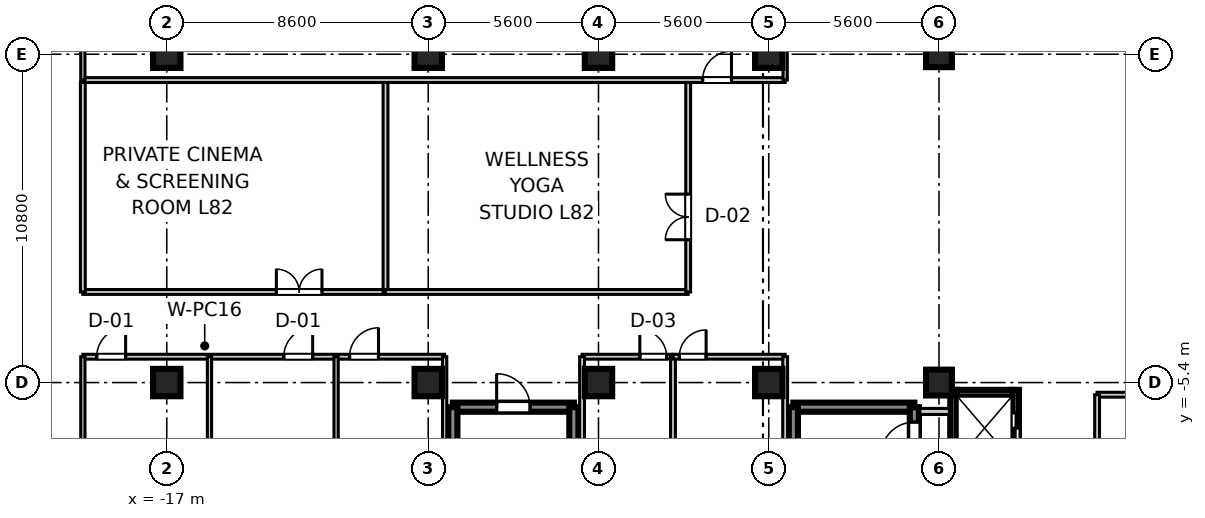
"""IFC4 building model, lengths in metres.
Left out: names, types, materials, properties, quantities, classifications, styles, units other than length and angle.
Written with IfcOpenShell. Run it as: python <this file> out.ifc"""

import sys

from ifc_helpers import new_model, si_unit, direction, frame, frame_2d, origin, origin_2d, place, context, subcontext, project, spatial, rectangle, extrude, source, transform, mapped, element, fill, save


model = new_model("IFC4")
c1 = context("Model", 3, precision=1e-05, world=origin(), true_north=direction((0.0, 1.0)))
c2 = subcontext(c1, "Body", "Model", "MODEL_VIEW")
j1 = project(units=[si_unit("LENGTHUNIT", "METRE"), si_unit("PLANEANGLEUNIT", "RADIAN")], contexts=[c1])
p1 = place(None, origin())
s1 = spatial("IfcSite", under=j1, at=p1, CompositionType="ELEMENT")
p2 = place(p1, origin())
s2 = spatial("IfcBuilding", under=s1, at=p2, CompositionType="ELEMENT")
p3 = place(p2, frame((0.0, 0.0, 319.55)))
s3 = spatial("IfcBuildingStorey", under=s2, at=p3, CompositionType="ELEMENT", Elevation=319.55)
m1 = source(origin(), c2, "Body", "SweptSolid", [
    extrude(rectangle(XDim=0.9, YDim=0.9, at=origin_2d()), origin(), (0.0, 0.0, 1.0), 3.755),
])
for number, where, z_axis, x_axis in (
    (1, (-17.0, -5.4, 0.0), (0.0, 0.0, 1.0), (1.0, 0.0, 0.0)),
    (2, (-17.0, 5.4, 0.0), (0.0, 0.0, 1.0), (1.0, 0.0, 0.0)),
    (3, (-8.4, -5.4, 0.0), (0.0, 0.0, 1.0), (1.0, 0.0, 0.0)),
    (4, (-8.4, 5.4, 0.0), (0.0, 0.0, 1.0), (1.0, 0.0, 0.0)),
    (5, (-2.8, -5.4, 0.0), (0.0, 0.0, 1.0), (1.0, 0.0, 0.0)),
    (6, (-2.8, 5.4, 0.0), (0.0, 0.0, 1.0), (1.0, 0.0, 0.0)),
    (7, (2.8, -5.4, 0.0), (0.0, 0.0, 1.0), (1.0, 0.0, 0.0)),
    (8, (2.8, 5.4, 0.0), (0.0, 0.0, 1.0), (1.0, 0.0, 0.0)),
):
    element("IfcColumn", number, at=place(p3, frame(where, z_axis=z_axis, x_axis=x_axis)), inside=s3, PredefinedType="COLUMN", context=c2, shape_type="MappedRepresentation", body=[
        mapped(m1, transform((0.0, 0.0, 0.0), scale=1.0)),
    ])
m2 = source(origin(), c2, "Body", "SweptSolid", [
    extrude(rectangle(XDim=0.85, YDim=0.85, at=origin_2d()), origin(), (0.0, 0.0, 1.0), 3.755),
])
for number, where, z_axis, x_axis in (
    (9, (8.4, -5.4, 0.0), (0.0, 0.0, 1.0), (1.0, 0.0, 0.0)),
    (10, (8.4, 5.4, 0.0), (0.0, 0.0, 1.0), (1.0, 0.0, 0.0)),
):
    element("IfcColumn", number, at=place(p3, frame(where, z_axis=z_axis, x_axis=x_axis)), inside=s3, PredefinedType="PILASTER", context=c2, shape_type="MappedRepresentation", body=[
        mapped(m2, transform((0.0, 0.0, 0.0), scale=1.0)),
    ])
m3 = source(origin(), c2, "Body", "SweptSolid", [
    extrude(rectangle(XDim=3.98, YDim=0.3, at=frame_2d((1.99, 0.0))), origin(), (0.0, 0.0, 1.0), 3.5),
])
p4 = place(p3, frame((3.61, -6.21, 0.0), z_axis=(0.0, 0.0, 1.0), x_axis=(1.0, 0.0, 0.0)))
e11 = element("IfcWall", 11, at=p4, inside=s3, PredefinedType="SHEAR", context=c2, shape_type="MappedRepresentation", body=[
    mapped(m3, transform((0.0, 0.0, 0.0), scale=1.0)),
])
m4 = source(origin(), c2, "Body", "SweptSolid", [
    extrude(rectangle(XDim=9.38, YDim=0.3, at=frame_2d((4.69, 0.0))), origin(), (0.0, 0.0, 1.0), 3.5),
])
p5 = place(p3, frame((3.61, -15.59, 0.0), z_axis=(0.0, 0.0, 1.0), x_axis=(0.0, 1.0, 0.0)))
e12 = element("IfcWall", 12, at=p5, inside=s3, PredefinedType="SHEAR", context=c2, shape_type="MappedRepresentation", body=[
    mapped(m4, transform((0.0, 0.0, 0.0), scale=1.0)),
])
p6 = place(p3, frame((7.59, -15.59, 0.0), z_axis=(0.0, 0.0, 1.0), x_axis=(0.0, 1.0, 0.0)))
e13 = element("IfcWall", 13, at=p6, inside=s3, PredefinedType="SHEAR", context=c2, shape_type="MappedRepresentation", body=[
    mapped(m4, transform((0.0, 0.0, 0.0), scale=1.0)),
])
p7 = place(p6, frame((7.79, 0.0, 0.0)))
e14 = element("IfcOpeningElement", 14, at=p7, cuts=e13, PredefinedType="OPENING", context=c2, shape_type="SweptSolid", body=[
    extrude(rectangle(XDim=1.1, YDim=2.15, at=frame_2d((0.55, 1.075))), frame((0.0, 0.16, 0.0), z_axis=(0.0, -1.0, 0.0), x_axis=(1.0, 0.0, 0.0)), (0.0, 0.0, 1.0), 0.32),
])
p8 = place(p3, frame((-7.59, -6.21, 0.0), z_axis=(0.0, 0.0, 1.0), x_axis=(1.0, 0.0, 0.0)))
e15 = element("IfcWall", 15, at=p8, inside=s3, PredefinedType="SHEAR", context=c2, shape_type="MappedRepresentation", body=[
    mapped(m3, transform((0.0, 0.0, 0.0), scale=1.0)),
])
p9 = place(p8, frame((1.44, 0.0, 0.0)))
e16 = element("IfcOpeningElement", 16, at=p9, cuts=e15, PredefinedType="OPENING", context=c2, shape_type="SweptSolid", body=[
    extrude(rectangle(XDim=1.1, YDim=2.15, at=frame_2d((0.55, 1.075))), frame((0.0, 0.16, 0.0), z_axis=(0.0, -1.0, 0.0), x_axis=(1.0, 0.0, 0.0)), (0.0, 0.0, 1.0), 0.32),
])
for number, where, z_axis, x_axis in (
    (17, (-7.59, -15.59, 0.0), (0.0, 0.0, 1.0), (0.0, 1.0, 0.0)),
    (18, (-3.61, -15.59, 0.0), (0.0, 0.0, 1.0), (0.0, 1.0, 0.0)),
):
    element("IfcWall", number, at=place(p3, frame(where, z_axis=z_axis, x_axis=x_axis)), inside=s3, PredefinedType="SHEAR", context=c2, shape_type="MappedRepresentation", body=[
        mapped(m4, transform((0.0, 0.0, 0.0), scale=1.0)),
    ])
m5 = source(origin(), c2, "Body", "SweptSolid", [
    extrude(rectangle(XDim=2.36, YDim=0.22, at=frame_2d((1.18, 0.0))), origin(), (0.0, 0.0, 1.0), 3.5),
])
p10 = place(p3, frame((8.88, -8.0, 0.0), z_axis=(0.0, 0.0, 1.0), x_axis=(0.0, 1.0, 0.0)))
e19 = element("IfcWall", 19, at=p10, inside=s3, PredefinedType="SHEAR", context=c2, shape_type="MappedRepresentation", body=[
    mapped(m5, transform((0.0, 0.0, 0.0), scale=1.0)),
])
p11 = place(p3, frame((10.92, -8.0, 0.0), z_axis=(0.0, 0.0, 1.0), x_axis=(0.0, 1.0, 0.0)))
e20 = element("IfcWall", 20, at=p11, inside=s3, PredefinedType="SHEAR", context=c2, shape_type="MappedRepresentation", body=[
    mapped(m5, transform((0.0, 0.0, 0.0), scale=1.0)),
])
p12 = place(p11, frame((0.6, 0.0, 0.0)))
e21 = element("IfcOpeningElement", 21, at=p12, cuts=e20, PredefinedType="OPENING", context=c2, shape_type="SweptSolid", body=[
    extrude(rectangle(XDim=1.0, YDim=2.2, at=frame_2d((0.5, 1.1))), frame((0.0, 0.12, 0.0), z_axis=(0.0, -1.0, 0.0), x_axis=(1.0, 0.0, 0.0)), (0.0, 0.0, 1.0), 0.24),
])
m6 = source(origin(), c2, "Body", "SweptSolid", [
    extrude(rectangle(XDim=1.82, YDim=0.22, at=frame_2d((0.91, 0.0))), origin(), (0.0, 0.0, 1.0), 3.5),
])
p13 = place(p3, frame((8.99, -5.75, 0.0), z_axis=(0.0, 0.0, 1.0), x_axis=(1.0, 0.0, 0.0)))
e22 = element("IfcWall", 22, at=p13, inside=s3, PredefinedType="SHEAR", context=c2, shape_type="MappedRepresentation", body=[
    mapped(m6, transform((0.0, 0.0, 0.0), scale=1.0)),
])
m7 = source(origin(), c2, "Body", "SweptSolid", [
    extrude(rectangle(XDim=0.97, YDim=0.2, at=frame_2d((0.485, 0.0))), origin(), (0.0, 0.0, 1.0), 2.84),
])
p14 = place(p3, frame((7.77, -6.35, 0.0), z_axis=(0.0, 0.0, 1.0), x_axis=(1.0, 0.0, 0.0)))
e23 = element("IfcWall", 23, at=p14, inside=s3, PredefinedType="PARTITIONING", context=c2, shape_type="MappedRepresentation", body=[
    mapped(m7, transform((0.0, 0.0, 0.0), scale=1.0)),
])
m8 = source(origin(), c2, "Body", "SweptSolid", [
    extrude(rectangle(XDim=2.05, YDim=0.16, at=frame_2d((1.025, 0.0))), origin(), (0.0, 0.0, 1.0), 2.84),
])
p15 = place(p3, frame((13.6, -5.8, 0.0), z_axis=(0.0, 0.0, 1.0), x_axis=(1.0, 0.0, 0.0)))
e24 = element("IfcWall", 24, at=p15, inside=s3, PredefinedType="PARTITIONING", context=c2, shape_type="MappedRepresentation", body=[
    mapped(m8, transform((0.0, 0.0, 0.0), scale=1.0)),
])
m9 = source(origin(), c2, "Body", "SweptSolid", [
    extrude(rectangle(XDim=8.7, YDim=0.16, at=frame_2d((4.35, 0.0))), origin(), (0.0, 0.0, 1.0), 2.84),
])
p16 = place(p3, frame((13.6, -14.5, 0.0), z_axis=(0.0, 0.0, 1.0), x_axis=(0.0, 1.0, 0.0)))
e25 = element("IfcWall", 25, at=p16, inside=s3, PredefinedType="PARTITIONING", context=c2, shape_type="MappedRepresentation", body=[
    mapped(m9, transform((0.0, 0.0, 0.0), scale=1.0)),
])
p17 = place(p16, frame((3.85, 0.0, 0.0)))
e26 = element("IfcOpeningElement", 26, at=p17, cuts=e25, PredefinedType="OPENING", context=c2, shape_type="SweptSolid", body=[
    extrude(rectangle(XDim=1.0, YDim=2.1, at=frame_2d((0.5, 1.05))), frame((0.0, 0.09, 0.0), z_axis=(0.0, -1.0, 0.0), x_axis=(1.0, 0.0, 0.0)), (0.0, 0.0, 1.0), 0.18),
])
m10 = source(origin(), c2, "Body", "SweptSolid", [
    extrude(rectangle(XDim=23.1, YDim=0.16, at=frame_2d((11.55, 0.0))), origin(), (0.0, 0.0, 1.0), 2.84),
])
p18 = place(p3, frame((-19.76, 4.55, 0.0), z_axis=(0.0, 0.0, 1.0), x_axis=(1.0, 0.0, 0.0)))
e27 = element("IfcWall", 27, at=p18, inside=s3, PredefinedType="PARTITIONING", context=c2, shape_type="MappedRepresentation", body=[
    mapped(m10, transform((0.0, 0.0, 0.0), scale=1.0)),
])
p19 = place(p18, frame((20.385, 0.0, 0.0)))
e28 = element("IfcOpeningElement", 28, at=p19, cuts=e27, PredefinedType="OPENING", context=c2, shape_type="SweptSolid", body=[
    extrude(rectangle(XDim=0.95, YDim=2.1, at=frame_2d((0.475, 1.05))), frame((0.0, 0.09, 0.0), z_axis=(0.0, -1.0, 0.0), x_axis=(1.0, 0.0, 0.0)), (0.0, 0.0, 1.0), 0.18),
])
m11 = source(origin(), c2, "Body", "SweptSolid", [
    extrude(rectangle(XDim=16.53, YDim=0.14, at=frame_2d((8.265, 0.0))), origin(), (0.0, 0.0, 1.0), 2.84),
])
p20 = place(p3, frame((-19.76, 4.55, 0.0), z_axis=(0.0, 0.0, 1.0), x_axis=(0.0, 1.0, 0.0)))
e29 = element("IfcWall", 29, at=p20, inside=s3, PredefinedType="PARTITIONING", context=c2, shape_type="MappedRepresentation", body=[
    mapped(m11, transform((0.0, 0.0, 0.0), scale=1.0)),
])
m12 = source(origin(), c2, "Body", "SweptSolid", [
    extrude(rectangle(XDim=17.95, YDim=0.14, at=frame_2d((8.975, 0.0))), origin(), (0.0, 0.0, 1.0), 2.84),
])
p21 = place(p3, frame((3.34, 4.55, 0.0), z_axis=(0.0, 0.0, 1.0), x_axis=(0.0, 1.0, 0.0)))
e30 = element("IfcWall", 30, at=p21, inside=s3, PredefinedType="PARTITIONING", context=c2, shape_type="MappedRepresentation", body=[
    mapped(m12, transform((0.0, 0.0, 0.0), scale=1.0)),
])
m13 = source(origin(), c2, "Body", "SweptSolid", [
    extrude(rectangle(XDim=11.9, YDim=0.16, at=frame_2d((5.95, 0.0))), origin(), (0.0, 0.0, 1.0), 2.84),
])
p22 = place(p3, frame((-19.76, -4.55, 0.0), z_axis=(0.0, 0.0, 1.0), x_axis=(1.0, 0.0, 0.0)))
e31 = element("IfcWall", 31, at=p22, inside=s3, PredefinedType="PARTITIONING", context=c2, shape_type="MappedRepresentation", body=[
    mapped(m13, transform((0.0, 0.0, 0.0), scale=1.0)),
])
p23 = place(p22, frame((0.457, 0.0, 0.0)))
e32 = element("IfcOpeningElement", 32, at=p23, cuts=e31, PredefinedType="OPENING", context=c2, shape_type="SweptSolid", body=[
    extrude(rectangle(XDim=0.95, YDim=2.1, at=frame_2d((0.475, 1.05))), frame((0.0, 0.09, 0.0), z_axis=(0.0, -1.0, 0.0), x_axis=(1.0, 0.0, 0.0)), (0.0, 0.0, 1.0), 0.18),
])
p24 = place(p22, frame((6.609, 0.0, 0.0)))
e33 = element("IfcOpeningElement", 33, at=p24, cuts=e31, PredefinedType="OPENING", context=c2, shape_type="SweptSolid", body=[
    extrude(rectangle(XDim=0.95, YDim=2.1, at=frame_2d((0.475, 1.05))), frame((0.0, 0.09, 0.0), z_axis=(0.0, -1.0, 0.0), x_axis=(1.0, 0.0, 0.0)), (0.0, 0.0, 1.0), 0.18),
])
p25 = place(p22, frame((8.774, 0.0, 0.0)))
e34 = element("IfcOpeningElement", 34, at=p25, cuts=e31, PredefinedType="OPENING", context=c2, shape_type="SweptSolid", body=[
    extrude(rectangle(XDim=0.95, YDim=2.1, at=frame_2d((0.475, 1.05))), frame((0.0, 0.09, 0.0), z_axis=(0.0, -1.0, 0.0), x_axis=(1.0, 0.0, 0.0)), (0.0, 0.0, 1.0), 0.18),
])
p26 = place(p3, frame((-19.76, -21.08, 0.0), z_axis=(0.0, 0.0, 1.0), x_axis=(0.0, 1.0, 0.0)))
e35 = element("IfcWall", 35, at=p26, inside=s3, PredefinedType="PARTITIONING", context=c2, shape_type="MappedRepresentation", body=[
    mapped(m11, transform((0.0, 0.0, 0.0), scale=1.0)),
])
for number, where, z_axis, x_axis in (
    (36, (-7.86, -22.5, 0.0), (0.0, 0.0, 1.0), (0.0, 1.0, 0.0)),
    (37, (-15.595, -22.5, 0.0), (0.0, 0.0, 1.0), (0.0, 1.0, 0.0)),
    (38, (-11.43, -22.5, 0.0), (0.0, 0.0, 1.0), (0.0, 1.0, 0.0)),
):
    element("IfcWall", number, at=place(p3, frame(where, z_axis=z_axis, x_axis=x_axis)), inside=s3, PredefinedType="PARTITIONING", context=c2, shape_type="MappedRepresentation", body=[
        mapped(m12, transform((0.0, 0.0, 0.0), scale=1.0)),
    ])
m14 = source(origin(), c2, "Body", "SweptSolid", [
    extrude(rectangle(XDim=2.99, YDim=0.16, at=frame_2d((1.495, 0.0))), origin(), (0.0, 0.0, 1.0), 2.84),
])
p27 = place(p3, frame((-3.34, -4.55, 0.0), z_axis=(0.0, 0.0, 1.0), x_axis=(1.0, 0.0, 0.0)))
e39 = element("IfcWall", 39, at=p27, inside=s3, PredefinedType="PARTITIONING", context=c2, shape_type="MappedRepresentation", body=[
    mapped(m14, transform((0.0, 0.0, 0.0), scale=1.0)),
])
p28 = place(p27, frame((1.9, 0.0, 0.0)))
e40 = element("IfcOpeningElement", 40, at=p28, cuts=e39, PredefinedType="OPENING", context=c2, shape_type="SweptSolid", body=[
    extrude(rectangle(XDim=0.88, YDim=2.1, at=frame_2d((0.44, 1.05))), frame((0.0, 0.09, 0.0), z_axis=(0.0, -1.0, 0.0), x_axis=(1.0, 0.0, 0.0)), (0.0, 0.0, 1.0), 0.18),
])
m15 = source(origin(), c2, "Body", "SweptSolid", [
    extrude(rectangle(XDim=17.95, YDim=0.16, at=frame_2d((8.975, 0.0))), origin(), (0.0, 0.0, 1.0), 2.84),
])
for number, where, z_axis, x_axis in (
    (41, (-3.34, -22.5, 0.0), (0.0, 0.0, 1.0), (0.0, 1.0, 0.0)),
    (42, (-0.35, -22.5, 0.0), (0.0, 0.0, 1.0), (0.0, 1.0, 0.0)),
):
    element("IfcWall", number, at=place(p3, frame(where, z_axis=z_axis, x_axis=x_axis)), inside=s3, PredefinedType="PARTITIONING", context=c2, shape_type="MappedRepresentation", body=[
        mapped(m15, transform((0.0, 0.0, 0.0), scale=1.0)),
    ])
m16 = source(origin(), c2, "Body", "SweptSolid", [
    extrude(rectangle(XDim=3.69, YDim=0.16, at=frame_2d((1.845, 0.0))), origin(), (0.0, 0.0, 1.0), 2.84),
])
p29 = place(p3, frame((-0.35, -4.55, 0.0), z_axis=(0.0, 0.0, 1.0), x_axis=(1.0, 0.0, 0.0)))
e43 = element("IfcWall", 43, at=p29, inside=s3, PredefinedType="PARTITIONING", context=c2, shape_type="MappedRepresentation", body=[
    mapped(m16, transform((0.0, 0.0, 0.0), scale=1.0)),
])
p30 = place(p29, frame((0.21, 0.0, 0.0)))
e44 = element("IfcOpeningElement", 44, at=p30, cuts=e43, PredefinedType="OPENING", context=c2, shape_type="SweptSolid", body=[
    extrude(rectangle(XDim=0.88, YDim=2.1, at=frame_2d((0.44, 1.05))), frame((0.0, 0.09, 0.0), z_axis=(0.0, -1.0, 0.0), x_axis=(1.0, 0.0, 0.0)), (0.0, 0.0, 1.0), 0.18),
])
p31 = place(p3, frame((3.34, -22.5, 0.0), z_axis=(0.0, 0.0, 1.0), x_axis=(0.0, 1.0, 0.0)))
e45 = element("IfcWall", 45, at=p31, inside=s3, PredefinedType="PARTITIONING", context=c2, shape_type="MappedRepresentation", body=[
    mapped(m15, transform((0.0, 0.0, 0.0), scale=1.0)),
])
m17 = source(origin(), c2, "Body", "SweptSolid", [
    extrude(rectangle(XDim=9.955, YDim=0.16, at=frame_2d((4.978, 0.0))), origin(), (0.0, 0.0, 1.0), 2.84),
])
p32 = place(p3, frame((-19.76, -2.42, 0.0), z_axis=(0.0, 0.0, 1.0), x_axis=(1.0, 0.0, 0.0)))
e46 = element("IfcWall", 46, at=p32, inside=s3, PredefinedType="PARTITIONING", context=c2, shape_type="MappedRepresentation", body=[
    mapped(m17, transform((0.0, 0.0, 0.0), scale=1.0)),
])
p33 = place(p32, frame((6.365, 0.0, 0.0)))
e47 = element("IfcOpeningElement", 47, at=p33, cuts=e46, PredefinedType="OPENING", context=c2, shape_type="SweptSolid", body=[
    extrude(rectangle(XDim=1.5, YDim=2.15, at=frame_2d((0.75, 1.075))), frame((0.0, 0.09, 0.0), z_axis=(0.0, -1.0, 0.0), x_axis=(1.0, 0.0, 0.0)), (0.0, 0.0, 1.0), 0.18),
])
m18 = source(origin(), c2, "Body", "SweptSolid", [
    extrude(rectangle(XDim=6.89, YDim=0.16, at=frame_2d((3.445, 0.0))), origin(), (0.0, 0.0, 1.0), 2.84),
])
for number, where, z_axis, x_axis in (
    (48, (-19.76, -2.42, 0.0), (0.0, 0.0, 1.0), (0.0, 1.0, 0.0)),
    (49, (-9.805, -2.42, 0.0), (0.0, 0.0, 1.0), (0.0, 1.0, 0.0)),
):
    element("IfcWall", number, at=place(p3, frame(where, z_axis=z_axis, x_axis=x_axis)), inside=s3, PredefinedType="PARTITIONING", context=c2, shape_type="MappedRepresentation", body=[
        mapped(m18, transform((0.0, 0.0, 0.0), scale=1.0)),
    ])
m19 = source(origin(), c2, "Body", "SweptSolid", [
    extrude(rectangle(XDim=9.955, YDim=0.16, at=frame_2d((4.978, 0.0))), origin(), (0.0, 0.0, 1.0), 2.84),
])
p34 = place(p3, frame((-9.805, -2.42, 0.0), z_axis=(0.0, 0.0, 1.0), x_axis=(1.0, 0.0, 0.0)))
e50 = element("IfcWall", 50, at=p34, inside=s3, PredefinedType="PARTITIONING", context=c2, shape_type="MappedRepresentation", body=[
    mapped(m19, transform((0.0, 0.0, 0.0), scale=1.0)),
])
p35 = place(p3, frame((0.15, -2.42, 0.0), z_axis=(0.0, 0.0, 1.0), x_axis=(0.0, 1.0, 0.0)))
e51 = element("IfcWall", 51, at=p35, inside=s3, PredefinedType="PARTITIONING", context=c2, shape_type="MappedRepresentation", body=[
    mapped(m18, transform((0.0, 0.0, 0.0), scale=1.0)),
])
p36 = place(p35, frame((1.718, 0.0, 0.0)))
e52 = element("IfcOpeningElement", 52, at=p36, cuts=e51, PredefinedType="OPENING", context=c2, shape_type="SweptSolid", body=[
    extrude(rectangle(XDim=1.5, YDim=2.15, at=frame_2d((0.75, 1.075))), frame((0.0, 0.09, 0.0), z_axis=(0.0, -1.0, 0.0), x_axis=(1.0, 0.0, 0.0)), (0.0, 0.0, 1.0), 0.18),
])
m20 = source(origin(), c2, "Body", "SweptSolid", [
    extrude(rectangle(XDim=1.1, YDim=2.15, at=frame_2d((0.55, 1.075))), frame((0.0, 0.025, 0.0), z_axis=(0.0, -1.0, 0.0), x_axis=(1.0, 0.0, 0.0)), (0.0, 0.0, 1.0), 0.05),
])
p37 = place(p7, origin())
e53 = element("IfcDoor", 53, at=p37, inside=s3, OperationType="SINGLE_SWING_LEFT", PredefinedType="DOOR", context=c2, shape_type="MappedRepresentation", body=[
    mapped(m20, transform((0.0, 0.0, 0.0), scale=1.0)),
])
fill(e14, e53)
p38 = place(p9, frame((1.1, 0.0, 0.0), z_axis=(0.0, 0.0, 1.0), x_axis=(-1.0, 0.0, 0.0)))
e54 = element("IfcDoor", 54, at=p38, inside=s3, OperationType="SINGLE_SWING_LEFT", PredefinedType="DOOR", context=c2, shape_type="MappedRepresentation", body=[
    mapped(m20, transform((0.0, 0.0, 0.0), scale=1.0)),
])
fill(e16, e54)
m21 = source(origin(), c2, "Body", "SweptSolid", [
    extrude(rectangle(XDim=1.0, YDim=2.2, at=frame_2d((0.5, 1.1))), frame((0.0, 0.025, 0.0), z_axis=(0.0, -1.0, 0.0), x_axis=(1.0, 0.0, 0.0)), (0.0, 0.0, 1.0), 0.05),
])
p39 = place(p12, frame((1.0, 0.0, 0.0), z_axis=(0.0, 0.0, 1.0), x_axis=(-1.0, 0.0, 0.0)))
e55 = element("IfcDoor", 55, at=p39, inside=s3, OperationType="DOUBLE_DOOR_SLIDING", PredefinedType="DOOR", context=c2, shape_type="MappedRepresentation", body=[
    mapped(m21, transform((0.0, 0.0, 0.0), scale=1.0)),
])
fill(e21, e55)
m22 = source(origin(), c2, "Body", "SweptSolid", [
    extrude(rectangle(XDim=0.95, YDim=2.1, at=frame_2d((0.475, 1.05))), frame((0.0, 0.025, 0.0), z_axis=(0.0, -1.0, 0.0), x_axis=(1.0, 0.0, 0.0)), (0.0, 0.0, 1.0), 0.05),
])
p40 = place(p19, origin())
e56 = element("IfcDoor", 56, at=p40, inside=s3, OperationType="SINGLE_SWING_RIGHT", PredefinedType="DOOR", context=c2, shape_type="MappedRepresentation", body=[
    mapped(m22, transform((0.0, 0.0, 0.0), scale=1.0)),
])
fill(e28, e56)
p41 = place(p23, frame((0.95, 0.0, 0.0), z_axis=(0.0, 0.0, 1.0), x_axis=(-1.0, 0.0, 0.0)))
e57 = element("IfcDoor", 57, at=p41, inside=s3, OperationType="SINGLE_SWING_RIGHT", PredefinedType="DOOR", context=c2, shape_type="MappedRepresentation", body=[
    mapped(m22, transform((0.0, 0.0, 0.0), scale=1.0)),
])
fill(e32, e57)
p42 = place(p24, frame((0.95, 0.0, 0.0), z_axis=(0.0, 0.0, 1.0), x_axis=(-1.0, 0.0, 0.0)))
e58 = element("IfcDoor", 58, at=p42, inside=s3, OperationType="SINGLE_SWING_RIGHT", PredefinedType="DOOR", context=c2, shape_type="MappedRepresentation", body=[
    mapped(m22, transform((0.0, 0.0, 0.0), scale=1.0)),
])
fill(e33, e58)
p43 = place(p25, frame((0.95, 0.0, 0.0), z_axis=(0.0, 0.0, 1.0), x_axis=(-1.0, 0.0, 0.0)))
e59 = element("IfcDoor", 59, at=p43, inside=s3, OperationType="SINGLE_SWING_RIGHT", PredefinedType="DOOR", context=c2, shape_type="MappedRepresentation", body=[
    mapped(m22, transform((0.0, 0.0, 0.0), scale=1.0)),
])
fill(e34, e59)
m23 = source(origin(), c2, "Body", "SweptSolid", [
    extrude(rectangle(XDim=0.88, YDim=2.1, at=frame_2d((0.44, 1.05))), frame((0.0, 0.025, 0.0), z_axis=(0.0, -1.0, 0.0), x_axis=(1.0, 0.0, 0.0)), (0.0, 0.0, 1.0), 0.05),
])
p44 = place(p28, frame((0.88, 0.0, 0.0), z_axis=(0.0, 0.0, 1.0), x_axis=(-1.0, 0.0, 0.0)))
e60 = element("IfcDoor", 60, at=p44, inside=s3, OperationType="SINGLE_SWING_LEFT", PredefinedType="DOOR", context=c2, shape_type="MappedRepresentation", body=[
    mapped(m23, transform((0.0, 0.0, 0.0), scale=1.0)),
])
fill(e40, e60)
p45 = place(p30, frame((0.88, 0.0, 0.0), z_axis=(0.0, 0.0, 1.0), x_axis=(-1.0, 0.0, 0.0)))
e61 = element("IfcDoor", 61, at=p45, inside=s3, OperationType="SINGLE_SWING_RIGHT", PredefinedType="DOOR", context=c2, shape_type="MappedRepresentation", body=[
    mapped(m23, transform((0.0, 0.0, 0.0), scale=1.0)),
])
fill(e44, e61)
m24 = source(origin(), c2, "Body", "SweptSolid", [
    extrude(rectangle(XDim=1.5, YDim=2.15, at=frame_2d((0.75, 1.075))), frame((0.0, 0.025, 0.0), z_axis=(0.0, -1.0, 0.0), x_axis=(1.0, 0.0, 0.0)), (0.0, 0.0, 1.0), 0.05),
])
p46 = place(p33, origin())
e62 = element("IfcDoor", 62, at=p46, inside=s3, OperationType="DOUBLE_DOOR_SINGLE_SWING", PredefinedType="DOOR", context=c2, shape_type="MappedRepresentation", body=[
    mapped(m24, transform((0.0, 0.0, 0.0), scale=1.0)),
])
fill(e47, e62)
p47 = place(p36, origin())
e63 = element("IfcDoor", 63, at=p47, inside=s3, OperationType="DOUBLE_DOOR_SINGLE_SWING", PredefinedType="DOOR", context=c2, shape_type="MappedRepresentation", body=[
    mapped(m24, transform((0.0, 0.0, 0.0), scale=1.0)),
])
fill(e52, e63)
save(model, sys.argv[1])
